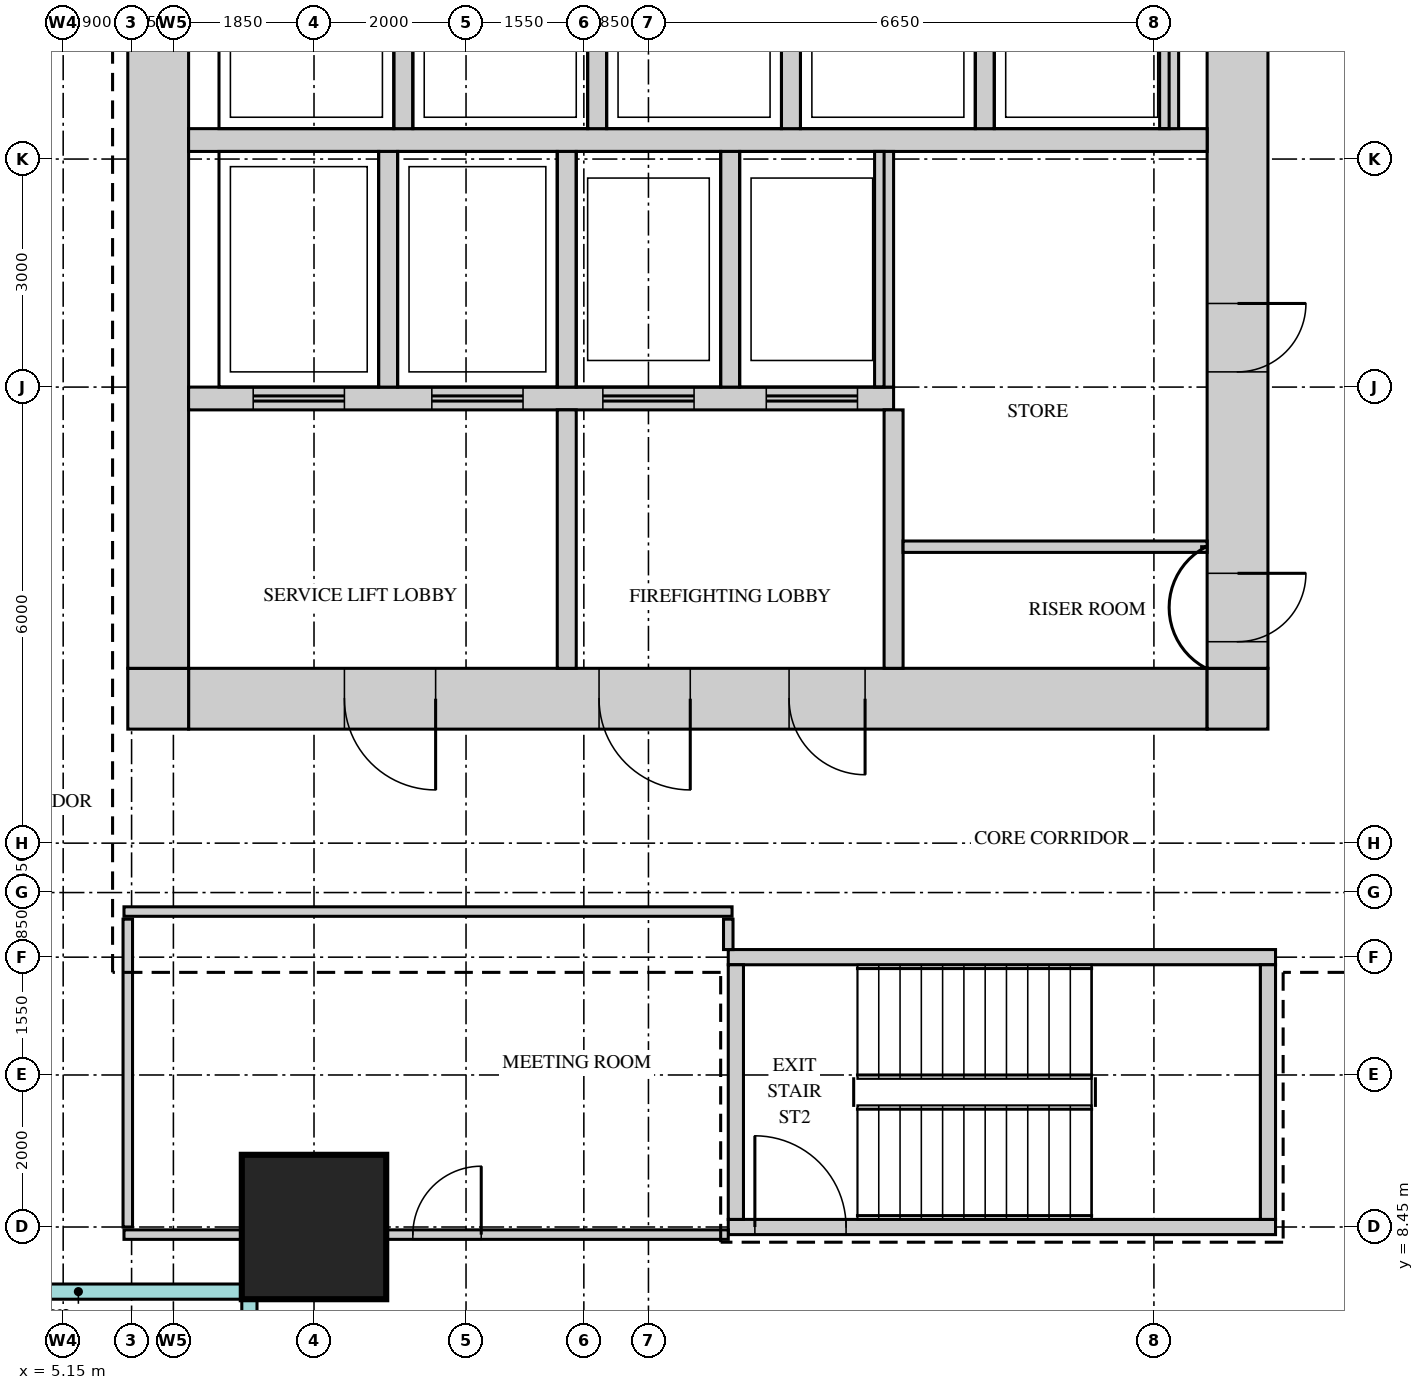
"""IFC4 building model, lengths in metres.
Left out: names, types, materials, properties, quantities, classifications, styles, units other than length and angle.
Written with IfcOpenShell. Run it as: python <this file> out.ifc"""

import sys

from ifc_helpers import new_model, si_unit, direction, frame, frame_2d, origin, origin_2d, place, context, subcontext, project, spatial, rectangle, extrude, source, transform, mapped, element, fill, save


model = new_model("IFC4")
c1 = context("Model", 3, precision=1e-05, world=origin(), true_north=direction((0.0, 1.0)))
c2 = subcontext(c1, "Body", "Model", "MODEL_VIEW")
j1 = project(units=[si_unit("LENGTHUNIT", "METRE"), si_unit("PLANEANGLEUNIT", "RADIAN")], contexts=[c1])
p1 = place(None, origin())
s1 = spatial("IfcSite", under=j1, at=p1, CompositionType="ELEMENT")
p2 = place(p1, origin())
s2 = spatial("IfcBuilding", under=s1, at=p2, CompositionType="ELEMENT")
p3 = place(p2, frame((0.0, 0.0, 180.7)))
s3 = spatial("IfcBuildingStorey", under=s2, at=p3, CompositionType="ELEMENT", Elevation=180.7)
m1 = source(origin(), c2, "Body", "SweptSolid", [
    extrude(rectangle(XDim=13.4, YDim=0.8, at=frame_2d((6.7, 0.0))), origin(), (0.0, 0.0, 1.0), 3.75),
])
p4 = place(p3, frame((6.8, 15.4, 0.0), z_axis=(0.0, 0.0, 1.0), x_axis=(1.0, 0.0, 0.0)))
e1 = element("IfcWall", 1, at=p4, inside=s3, PredefinedType="SHEAR", context=c2, shape_type="MappedRepresentation", body=[
    mapped(m1, transform((0.0, 0.0, 0.0))),
])
m2 = source(origin(), c2, "Body", "SweptSolid", [
    extrude(rectangle(XDim=1.2, YDim=2.1, at=frame_2d((0.6, 1.05))), frame((0.0, 0.41, 0.0), z_axis=(0.0, -1.0, 0.0), x_axis=(1.0, 0.0, 0.0)), (0.0, 0.0, 1.0), 0.82),
])
p5 = place(p4, frame((5.4, 0.0, 0.0)))
e2 = element("IfcOpeningElement", 2, at=p5, cuts=e1, PredefinedType="OPENING", context=c2, shape_type="MappedRepresentation", body=[
    mapped(m2, transform((0.0, 0.0, 0.0))),
])
p6 = place(p4, frame((2.05, 0.0, 0.0)))
e3 = element("IfcOpeningElement", 3, at=p6, cuts=e1, PredefinedType="OPENING", context=c2, shape_type="MappedRepresentation", body=[
    mapped(m2, transform((0.0, 0.0, 0.0))),
])
m3 = source(origin(), c2, "Body", "SweptSolid", [
    extrude(rectangle(XDim=1.0, YDim=2.1, at=frame_2d((0.5, 1.05))), frame((0.0, 0.41, 0.0), z_axis=(0.0, -1.0, 0.0), x_axis=(1.0, 0.0, 0.0)), (0.0, 0.0, 1.0), 0.82),
])
p7 = place(p4, frame((7.9, 0.0, 0.0)))
e4 = element("IfcOpeningElement", 4, at=p7, cuts=e1, PredefinedType="OPENING", context=c2, shape_type="MappedRepresentation", body=[
    mapped(m3, transform((0.0, 0.0, 0.0))),
])
m4 = source(origin(), c2, "Body", "SweptSolid", [
    extrude(rectangle(XDim=0.8, YDim=0.8, at=frame_2d((0.4, 0.0))), origin(), (0.0, 0.0, 1.0), 3.75),
])
for number, where, z_axis, x_axis in (
    (5, (20.2, 15.4, 0.0), (0.0, 0.0, 1.0), (1.0, 0.0, 0.0)),
    (6, (6.0, 15.4, 0.0), (0.0, 0.0, 1.0), (1.0, 0.0, 0.0)),
):
    element("IfcWall", number, at=place(p3, frame(where, z_axis=z_axis, x_axis=x_axis)), inside=s3, PredefinedType="SHEAR", context=c2, shape_type="MappedRepresentation", body=[
        mapped(m4, transform((0.0, 0.0, 0.0))),
    ])
m5 = source(origin(), c2, "Body", "SweptSolid", [
    extrude(rectangle(XDim=22.4, YDim=0.8, at=frame_2d((11.2, 0.0))), origin(), (0.0, 0.0, 1.0), 3.75),
])
p8 = place(p3, frame((20.6, 15.8, 0.0), z_axis=(0.0, 0.0, 1.0), x_axis=(0.0, 1.0, 0.0)))
e7 = element("IfcWall", 7, at=p8, inside=s3, PredefinedType="SHEAR", context=c2, shape_type="MappedRepresentation", body=[
    mapped(m5, transform((0.0, 0.0, 0.0))),
])
m6 = source(origin(), c2, "Body", "SweptSolid", [
    extrude(rectangle(XDim=1.8, YDim=2.1, at=frame_2d((0.9, 1.05))), frame((0.0, 0.41, 0.0), z_axis=(0.0, -1.0, 0.0), x_axis=(1.0, 0.0, 0.0)), (0.0, 0.0, 1.0), 0.82),
])
p9 = place(p8, frame((10.7, 0.0, 0.0)))
e8 = element("IfcOpeningElement", 8, at=p9, cuts=e7, PredefinedType="OPENING", context=c2, shape_type="MappedRepresentation", body=[
    mapped(m6, transform((0.0, 0.0, 0.0))),
])
m7 = source(origin(), c2, "Body", "SweptSolid", [
    extrude(rectangle(XDim=0.9, YDim=2.1, at=frame_2d((0.45, 1.05))), frame((0.0, 0.41, 0.0), z_axis=(0.0, -1.0, 0.0), x_axis=(1.0, 0.0, 0.0)), (0.0, 0.0, 1.0), 0.82),
])
p10 = place(p8, frame((0.35, 0.0, 0.0)))
e9 = element("IfcOpeningElement", 9, at=p10, cuts=e7, PredefinedType="OPENING", context=c2, shape_type="MappedRepresentation", body=[
    mapped(m7, transform((0.0, 0.0, 0.0))),
])
p11 = place(p8, frame((3.9, 0.0, 0.0)))
e10 = element("IfcOpeningElement", 10, at=p11, cuts=e7, PredefinedType="OPENING", context=c2, shape_type="MappedRepresentation", body=[
    mapped(m7, transform((0.0, 0.0, 0.0))),
])
p12 = place(p3, frame((6.4, 15.8, 0.0), z_axis=(0.0, 0.0, 1.0), x_axis=(0.0, 1.0, 0.0)))
e11 = element("IfcWall", 11, at=p12, inside=s3, PredefinedType="SHEAR", context=c2, shape_type="MappedRepresentation", body=[
    mapped(m5, transform((0.0, 0.0, 0.0))),
])
m8 = source(origin(), c2, "Body", "SweptSolid", [
    extrude(rectangle(XDim=7.2, YDim=0.2, at=frame_2d((3.6, 0.0))), origin(), (0.0, 0.0, 1.0), 3.75),
])
p13 = place(p3, frame((13.9, 12.0, 0.0), z_axis=(0.0, 0.0, 1.0), x_axis=(1.0, 0.0, 0.0)))
e12 = element("IfcWall", 12, at=p13, inside=s3, PredefinedType="SHEAR", context=c2, shape_type="MappedRepresentation", body=[
    mapped(m8, transform((0.0, 0.0, 0.0))),
])
p14 = place(p3, frame((13.9, 8.45, 0.0), z_axis=(0.0, 0.0, 1.0), x_axis=(1.0, 0.0, 0.0)))
e13 = element("IfcWall", 13, at=p14, inside=s3, PredefinedType="SHEAR", context=c2, shape_type="MappedRepresentation", body=[
    mapped(m8, transform((0.0, 0.0, 0.0))),
])
m9 = source(origin(), c2, "Body", "SweptSolid", [
    extrude(rectangle(XDim=1.2, YDim=2.1, at=frame_2d((0.6, 1.05))), frame((0.0, 0.11, 0.0), z_axis=(0.0, -1.0, 0.0), x_axis=(1.0, 0.0, 0.0)), (0.0, 0.0, 1.0), 0.22),
])
p15 = place(p14, frame((0.35, 0.0, 0.0)))
e14 = element("IfcOpeningElement", 14, at=p15, cuts=e13, PredefinedType="OPENING", context=c2, shape_type="MappedRepresentation", body=[
    mapped(m9, transform((0.0, 0.0, 0.0))),
])
m10 = source(origin(), c2, "Body", "SweptSolid", [
    extrude(rectangle(XDim=3.35, YDim=0.2, at=frame_2d((1.675, 0.0))), origin(), (0.0, 0.0, 1.0), 3.75),
])
for number, where, z_axis, x_axis in (
    (15, (21.0, 8.55, 0.0), (0.0, 0.0, 1.0), (0.0, 1.0, 0.0)),
    (16, (14.0, 8.55, 0.0), (0.0, 0.0, 1.0), (0.0, 1.0, 0.0)),
):
    element("IfcWall", number, at=place(p3, frame(where, z_axis=z_axis, x_axis=x_axis)), inside=s3, PredefinedType="SHEAR", context=c2, shape_type="MappedRepresentation", body=[
        mapped(m10, transform((0.0, 0.0, 0.0))),
    ])
m11 = source(origin(), c2, "Body", "SweptSolid", [
    extrude(rectangle(XDim=13.4, YDim=0.3, at=frame_2d((6.7, 0.0))), origin(), (0.0, 0.0, 1.0), 3.75),
])
p16 = place(p3, frame((6.8, 22.75, 0.0), z_axis=(0.0, 0.0, 1.0), x_axis=(1.0, 0.0, 0.0)))
e17 = element("IfcWall", 17, at=p16, inside=s3, PredefinedType="STANDARD", context=c2, shape_type="MappedRepresentation", body=[
    mapped(m11, transform((0.0, 0.0, 0.0))),
])
m12 = source(origin(), c2, "Body", "SweptSolid", [
    extrude(rectangle(XDim=9.275, YDim=0.3, at=frame_2d((4.637, 0.0))), origin(), (0.0, 0.0, 1.0), 3.75),
])
p17 = place(p3, frame((6.8, 19.35, 0.0), z_axis=(0.0, 0.0, 1.0), x_axis=(1.0, 0.0, 0.0)))
e18 = element("IfcWall", 18, at=p17, inside=s3, PredefinedType="STANDARD", context=c2, shape_type="MappedRepresentation", body=[
    mapped(m12, transform((0.0, 0.0, 0.0))),
])
m13 = source(origin(), c2, "Body", "SweptSolid", [
    extrude(rectangle(XDim=1.2, YDim=2.1, at=frame_2d((0.6, 1.05))), frame((0.0, 0.16, 0.0), z_axis=(0.0, -1.0, 0.0), x_axis=(1.0, 0.0, 0.0)), (0.0, 0.0, 1.0), 0.32),
])
p18 = place(p17, frame((0.85, 0.0, 0.0)))
e19 = element("IfcOpeningElement", 19, at=p18, cuts=e18, PredefinedType="OPENING", context=c2, shape_type="MappedRepresentation", body=[
    mapped(m13, transform((0.0, 0.0, 0.0))),
])
p19 = place(p17, frame((3.2, 0.0, 0.0)))
e20 = element("IfcOpeningElement", 20, at=p19, cuts=e18, PredefinedType="OPENING", context=c2, shape_type="MappedRepresentation", body=[
    mapped(m13, transform((0.0, 0.0, 0.0))),
])
p20 = place(p17, frame((5.45, 0.0, 0.0)))
e21 = element("IfcOpeningElement", 21, at=p20, cuts=e18, PredefinedType="OPENING", context=c2, shape_type="MappedRepresentation", body=[
    mapped(m13, transform((0.0, 0.0, 0.0))),
])
p21 = place(p17, frame((7.6, 0.0, 0.0)))
e22 = element("IfcOpeningElement", 22, at=p21, cuts=e18, PredefinedType="OPENING", context=c2, shape_type="MappedRepresentation", body=[
    mapped(m13, transform((0.0, 0.0, 0.0))),
])
m14 = source(origin(), c2, "Body", "SweptSolid", [
    extrude(rectangle(XDim=3.1, YDim=0.25, at=frame_2d((1.55, 0.0))), origin(), (0.0, 0.0, 1.0), 3.75),
])
for number, where, z_axis, x_axis in (
    (23, (9.425, 19.5, 0.0), (0.0, 0.0, 1.0), (0.0, 1.0, 0.0)),
    (24, (11.775, 19.5, 0.0), (0.0, 0.0, 1.0), (0.0, 1.0, 0.0)),
    (25, (13.925, 19.5, 0.0), (0.0, 0.0, 1.0), (0.0, 1.0, 0.0)),
    (26, (15.95, 19.5, 0.0), (0.0, 0.0, 1.0), (0.0, 1.0, 0.0)),
):
    element("IfcWall", number, at=place(p3, frame(where, z_axis=z_axis, x_axis=x_axis)), inside=s3, PredefinedType="STANDARD", context=c2, shape_type="MappedRepresentation", body=[
        mapped(m14, transform((0.0, 0.0, 0.0))),
    ])
m15 = source(origin(), c2, "Body", "SweptSolid", [
    extrude(rectangle(XDim=2.4, YDim=0.25, at=frame_2d((1.2, 0.0))), origin(), (0.0, 0.0, 1.0), 3.75),
])
for number, where, z_axis, x_axis in (
    (27, (17.275, 22.9, 0.0), (0.0, 0.0, 1.0), (0.0, 1.0, 0.0)),
    (28, (19.7, 22.9, 0.0), (0.0, 0.0, 1.0), (0.0, 1.0, 0.0)),
    (29, (9.625, 22.9, 0.0), (0.0, 0.0, 1.0), (0.0, 1.0, 0.0)),
    (30, (12.175, 22.9, 0.0), (0.0, 0.0, 1.0), (0.0, 1.0, 0.0)),
    (31, (14.725, 22.9, 0.0), (0.0, 0.0, 1.0), (0.0, 1.0, 0.0)),
):
    element("IfcWall", number, at=place(p3, frame(where, z_axis=z_axis, x_axis=x_axis)), inside=s3, PredefinedType="STANDARD", context=c2, shape_type="MappedRepresentation", body=[
        mapped(m15, transform((0.0, 0.0, 0.0))),
    ])
m16 = source(origin(), c2, "Body", "SweptSolid", [
    extrude(rectangle(XDim=3.4, YDim=0.25, at=frame_2d((1.7, 0.0))), origin(), (0.0, 0.0, 1.0), 3.75),
])
for number, where, z_axis, x_axis in (
    (32, (16.075, 15.8, 0.0), (0.0, 0.0, 1.0), (0.0, 1.0, 0.0)),
    (33, (11.775, 15.8, 0.0), (0.0, 0.0, 1.0), (0.0, 1.0, 0.0)),
):
    element("IfcWall", number, at=place(p3, frame(where, z_axis=z_axis, x_axis=x_axis)), inside=s3, PredefinedType="STANDARD", context=c2, shape_type="MappedRepresentation", body=[
        mapped(m16, transform((0.0, 0.0, 0.0))),
    ])
m17 = source(origin(), c2, "Body", "SweptSolid", [
    extrude(rectangle(XDim=1.9, YDim=1.9, at=origin_2d()), origin(), (0.0, 0.0, 1.0), 4.0),
])
p22 = place(p3, frame((8.45, 8.45, 0.0), z_axis=(0.0, 0.0, 1.0), x_axis=(1.0, 0.0, 0.0)))
e34 = element("IfcColumn", 34, at=p22, inside=s3, PredefinedType="COLUMN", context=c2, shape_type="MappedRepresentation", body=[
    mapped(m17, transform((0.0, 0.0, 0.0))),
])
m18 = source(origin(), c2, "Body", "SweptSolid", [
    extrude(rectangle(XDim=7.95, YDim=0.125, at=frame_2d((3.975, 0.0))), origin(), (0.0, 0.0, 1.0), 3.25),
])
p23 = place(p3, frame((5.95, 8.35, 0.0), z_axis=(0.0, 0.0, 1.0), x_axis=(1.0, 0.0, 0.0)))
e35 = element("IfcWall", 35, at=p23, inside=s3, PredefinedType="PARTITIONING", context=c2, shape_type="MappedRepresentation", body=[
    mapped(m18, transform((0.0, 0.0, 0.0))),
])
m19 = source(origin(), c2, "Body", "SweptSolid", [
    extrude(rectangle(XDim=0.9, YDim=2.1, at=frame_2d((0.45, 1.05))), frame((0.0, 0.073, 0.0), z_axis=(0.0, -1.0, 0.0), x_axis=(1.0, 0.0, 0.0)), (0.0, 0.0, 1.0), 0.145),
])
p24 = place(p23, frame((3.8, 0.0, 0.0)))
e36 = element("IfcOpeningElement", 36, at=p24, cuts=e35, PredefinedType="OPENING", context=c2, shape_type="MappedRepresentation", body=[
    mapped(m19, transform((0.0, 0.0, 0.0))),
])
m20 = source(origin(), c2, "Body", "SweptSolid", [
    extrude(rectangle(XDim=4.05, YDim=0.125, at=frame_2d((2.025, 0.0))), origin(), (0.0, 0.0, 1.0), 3.8),
])
p25 = place(p3, frame((6.0, 8.45, 0.0), z_axis=(0.0, 0.0, 1.0), x_axis=(0.0, 1.0, 0.0)))
e37 = element("IfcWall", 37, at=p25, inside=s3, PredefinedType="PARTITIONING", context=c2, shape_type="MappedRepresentation", body=[
    mapped(m20, transform((0.0, 0.0, 0.0))),
])
m21 = source(origin(), c2, "Body", "SweptSolid", [
    extrude(rectangle(XDim=0.4, YDim=0.125, at=frame_2d((0.2, 0.0))), origin(), (0.0, 0.0, 1.0), 3.8),
])
p26 = place(p3, frame((13.9, 12.1, 0.0), z_axis=(0.0, 0.0, 1.0), x_axis=(0.0, 1.0, 0.0)))
e38 = element("IfcWall", 38, at=p26, inside=s3, PredefinedType="PARTITIONING", context=c2, shape_type="MappedRepresentation", body=[
    mapped(m21, transform((0.0, 0.0, 0.0))),
])
m22 = source(origin(), c2, "Body", "SweptSolid", [
    extrude(rectangle(XDim=8.0, YDim=0.125, at=frame_2d((4.0, 0.0))), origin(), (0.0, 0.0, 1.0), 3.8),
])
p27 = place(p3, frame((5.95, 12.6, 0.0), z_axis=(0.0, 0.0, 1.0), x_axis=(1.0, 0.0, 0.0)))
e39 = element("IfcWall", 39, at=p27, inside=s3, PredefinedType="PARTITIONING", context=c2, shape_type="MappedRepresentation", body=[
    mapped(m22, transform((0.0, 0.0, 0.0))),
])
m23 = source(origin(), c2, "Body", "SweptSolid", [
    extrude(rectangle(XDim=4.0, YDim=0.15, at=frame_2d((2.0, 0.0))), origin(), (0.0, 0.0, 1.0), 3.8),
])
p28 = place(p3, frame((16.2, 17.4, 0.0), z_axis=(0.0, 0.0, 1.0), x_axis=(1.0, 0.0, 0.0)))
e40 = element("IfcWall", 40, at=p28, inside=s3, PredefinedType="PARTITIONING", context=c2, shape_type="MappedRepresentation", body=[
    mapped(m23, transform((0.0, 0.0, 0.0))),
])
m24 = source(origin(), c2, "Body", "SweptSolid", [
    extrude(rectangle(XDim=0.9, YDim=2.1, at=frame_2d((0.45, 1.05))), frame((0.0, 0.35, 0.0), z_axis=(0.0, -1.0, 0.0), x_axis=(1.0, 0.0, 0.0)), (0.0, 0.0, 1.0), 0.7),
])
p29 = place(p10, origin())
e41 = element("IfcDoor", 41, at=p29, inside=s3, OperationType="SINGLE_SWING_RIGHT", PredefinedType="DOOR", context=c2, shape_type="MappedRepresentation", body=[
    mapped(m24, transform((0.0, 0.0, 0.0))),
])
fill(e9, e41)
p30 = place(p11, origin())
e42 = element("IfcDoor", 42, at=p30, inside=s3, OperationType="SINGLE_SWING_RIGHT", PredefinedType="DOOR", context=c2, shape_type="MappedRepresentation", body=[
    mapped(m24, transform((0.0, 0.0, 0.0))),
])
fill(e10, e42)
m25 = source(origin(), c2, "Body", "SweptSolid", [
    extrude(rectangle(XDim=1.2, YDim=2.1, at=frame_2d((0.6, 1.05))), frame((0.0, 0.35, 0.0), z_axis=(0.0, -1.0, 0.0), x_axis=(1.0, 0.0, 0.0)), (0.0, 0.0, 1.0), 0.7),
])
p31 = place(p5, origin())
e43 = element("IfcDoor", 43, at=p31, inside=s3, OperationType="SINGLE_SWING_RIGHT", PredefinedType="DOOR", context=c2, shape_type="MappedRepresentation", body=[
    mapped(m25, transform((0.0, 0.0, 0.0))),
])
fill(e2, e43)
p32 = place(p6, origin())
e44 = element("IfcDoor", 44, at=p32, inside=s3, OperationType="SINGLE_SWING_RIGHT", PredefinedType="DOOR", context=c2, shape_type="MappedRepresentation", body=[
    mapped(m25, transform((0.0, 0.0, 0.0))),
])
fill(e3, e44)
m26 = source(origin(), c2, "Body", "SweptSolid", [
    extrude(rectangle(XDim=1.0, YDim=2.1, at=frame_2d((0.5, 1.05))), frame((0.0, 0.35, 0.0), z_axis=(0.0, -1.0, 0.0), x_axis=(1.0, 0.0, 0.0)), (0.0, 0.0, 1.0), 0.7),
])
p33 = place(p7, origin())
e45 = element("IfcDoor", 45, at=p33, inside=s3, OperationType="SINGLE_SWING_RIGHT", PredefinedType="DOOR", context=c2, shape_type="MappedRepresentation", body=[
    mapped(m26, transform((0.0, 0.0, 0.0))),
])
fill(e4, e45)
m27 = source(origin(), c2, "Body", "SweptSolid", [
    extrude(rectangle(XDim=0.9, YDim=2.1, at=frame_2d((0.45, 1.05))), frame((0.0, 0.025, 0.0), z_axis=(0.0, -1.0, 0.0), x_axis=(1.0, 0.0, 0.0)), (0.0, 0.0, 1.0), 0.05),
])
p34 = place(p24, origin())
e46 = element("IfcDoor", 46, at=p34, inside=s3, OperationType="SINGLE_SWING_LEFT", PredefinedType="DOOR", context=c2, shape_type="MappedRepresentation", body=[
    mapped(m27, transform((0.0, 0.0, 0.0))),
])
fill(e36, e46)
m28 = source(origin(), c2, "Body", "SweptSolid", [
    extrude(rectangle(XDim=1.2, YDim=2.1, at=frame_2d((0.6, 1.05))), frame((0.0, 0.025, 0.0), z_axis=(0.0, -1.0, 0.0), x_axis=(1.0, 0.0, 0.0)), (0.0, 0.0, 1.0), 0.05),
])
p35 = place(p15, origin())
e47 = element("IfcDoor", 47, at=p35, inside=s3, OperationType="SINGLE_SWING_RIGHT", PredefinedType="DOOR", context=c2, shape_type="MappedRepresentation", body=[
    mapped(m28, transform((0.0, 0.0, 0.0))),
])
fill(e14, e47)
p36 = place(p18, origin())
e48 = element("IfcDoor", 48, at=p36, inside=s3, OperationType="DOUBLE_DOOR_SLIDING", PredefinedType="DOOR", context=c2, shape_type="MappedRepresentation", body=[
    mapped(m28, transform((0.0, 0.0, 0.0))),
])
fill(e19, e48)
p37 = place(p19, origin())
e49 = element("IfcDoor", 49, at=p37, inside=s3, OperationType="DOUBLE_DOOR_SLIDING", PredefinedType="DOOR", context=c2, shape_type="MappedRepresentation", body=[
    mapped(m28, transform((0.0, 0.0, 0.0))),
])
fill(e20, e49)
p38 = place(p20, origin())
e50 = element("IfcDoor", 50, at=p38, inside=s3, OperationType="DOUBLE_DOOR_SLIDING", PredefinedType="DOOR", context=c2, shape_type="MappedRepresentation", body=[
    mapped(m28, transform((0.0, 0.0, 0.0))),
])
fill(e21, e50)
p39 = place(p21, origin())
e51 = element("IfcDoor", 51, at=p39, inside=s3, OperationType="DOUBLE_DOOR_SLIDING", PredefinedType="DOOR", context=c2, shape_type="MappedRepresentation", body=[
    mapped(m28, transform((0.0, 0.0, 0.0))),
])
fill(e22, e51)
save(model, sys.argv[1])
